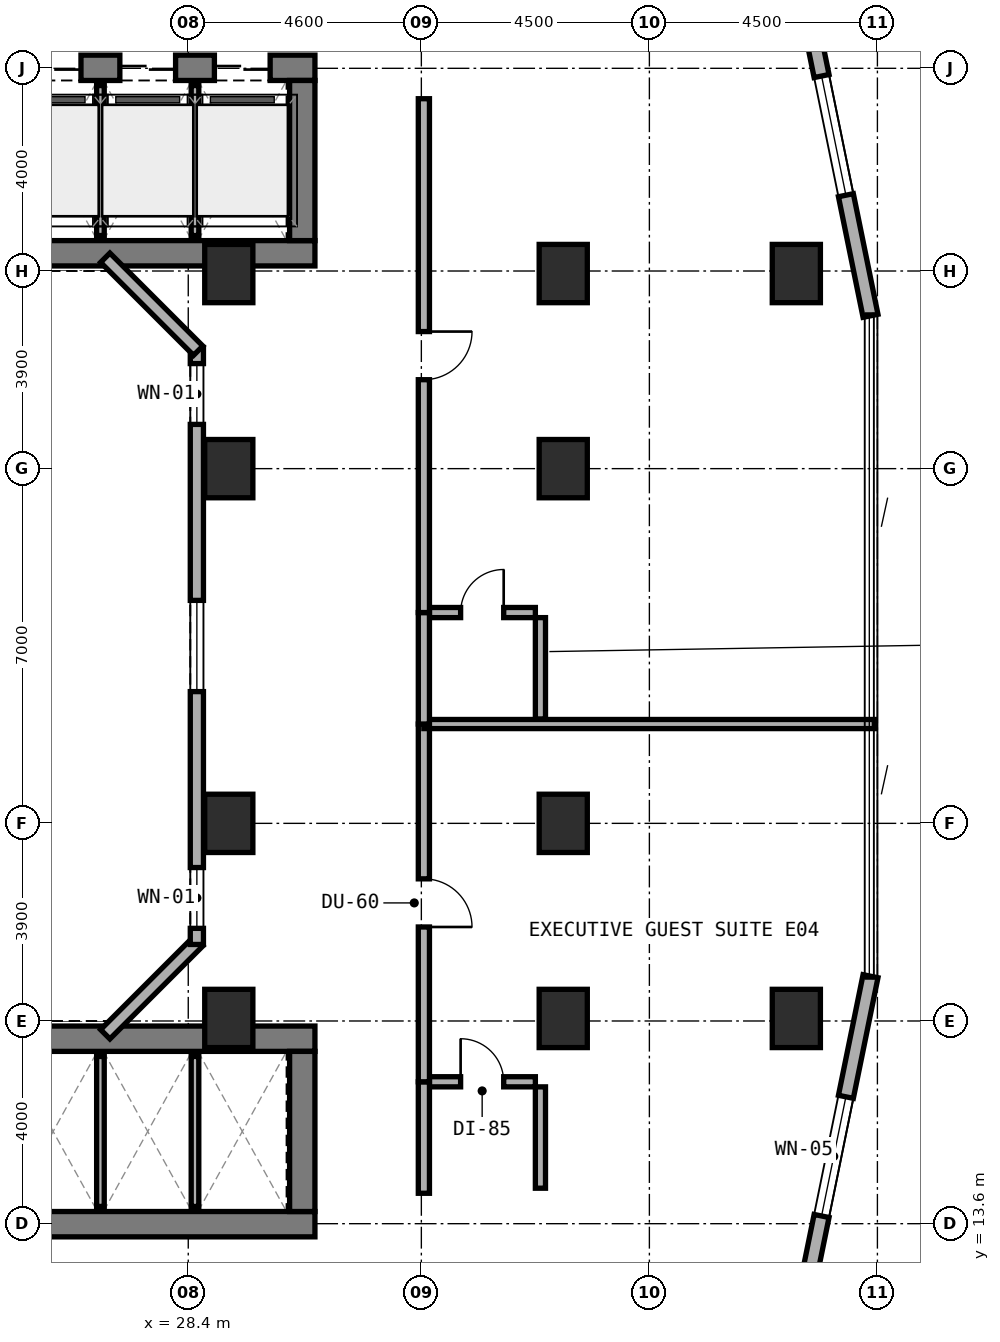
"""IFC4 building model, lengths in metres.
Left out: names, types, materials, properties, quantities, classifications, styles, units other than length and angle.
Written with IfcOpenShell. Run it as: python <this file> out.ifc"""

import sys

from ifc_helpers import new_model, si_unit, direction, frame, frame_2d, origin, origin_2d, place, context, subcontext, project, spatial, rectangle, extrude, element, fill, save


model = new_model("IFC4")
c1 = context("Model", 3, precision=1e-05, world=origin(), true_north=direction((0.0, 1.0)))
c2 = subcontext(c1, "Body", "Model", "MODEL_VIEW")
j1 = project(units=[si_unit("LENGTHUNIT", "METRE"), si_unit("PLANEANGLEUNIT", "RADIAN")], contexts=[c1])
p1 = place(None, origin())
s1 = spatial("IfcSite", under=j1, at=p1, CompositionType="ELEMENT")
p2 = place(p1, origin())
s2 = spatial("IfcBuilding", under=s1, at=p2, CompositionType="ELEMENT")
p3 = place(p2, frame((0.0, 0.0, 62.5)))
s3 = spatial("IfcBuildingStorey", under=s2, at=p3, CompositionType="ELEMENT", Elevation=62.5)
p4 = place(p3, frame((6.3, 32.75, 0.0), z_axis=(0.0, 0.0, 1.0), x_axis=(1.0, 0.0, 0.0)))
e1 = element("IfcWall", 1, at=p4, inside=s3, PredefinedType="SHEAR", context=c2, shape_type="SweptSolid", body=[
    extrude(rectangle(XDim=24.6, YDim=0.5, at=frame_2d((12.3, 0.0))), origin(), (0.0, 0.0, 1.0), 3.5),
])
p5 = place(p4, frame((6.15, 0.0, 0.0)))
e2 = element("IfcOpeningElement", 2, at=p5, cuts=e1, PredefinedType="OPENING", context=c2, shape_type="SweptSolid", body=[
    extrude(rectangle(XDim=1.1, YDim=2.15, at=frame_2d((0.55, 1.075))), frame((0.0, 0.26, 0.0), z_axis=(0.0, -1.0, 0.0), x_axis=(1.0, 0.0, 0.0)), (0.0, 0.0, 1.0), 0.52),
])
p6 = place(p3, frame((6.3, 36.41, 0.0), z_axis=(0.0, 0.0, 1.0), x_axis=(1.0, 0.0, 0.0)))
e3 = element("IfcWall", 3, at=p6, inside=s3, PredefinedType="SHEAR", context=c2, shape_type="SweptSolid", body=[
    extrude(rectangle(XDim=24.6, YDim=0.5, at=frame_2d((12.3, 0.0))), origin(), (0.0, 0.0, 1.0), 3.5),
])
p7 = place(p6, frame((9.25, 0.0, 0.0)))
e4 = element("IfcOpeningElement", 4, at=p7, cuts=e3, PredefinedType="OPENING", context=c2, shape_type="SweptSolid", body=[
    extrude(rectangle(XDim=1.2, YDim=2.15, at=frame_2d((0.6, 1.075))), frame((0.0, 0.26, 0.0), z_axis=(0.0, -1.0, 0.0), x_axis=(1.0, 0.0, 0.0)), (0.0, 0.0, 1.0), 0.52),
])
p8 = place(p6, frame((17.04, 0.0, 0.0)))
e5 = element("IfcOpeningElement", 5, at=p8, cuts=e3, PredefinedType="OPENING", context=c2, shape_type="SweptSolid", body=[
    extrude(rectangle(XDim=0.85, YDim=2.1, at=frame_2d((0.425, 1.05))), frame((0.0, 0.26, 0.0), z_axis=(0.0, -1.0, 0.0), x_axis=(1.0, 0.0, 0.0)), (0.0, 0.0, 1.0), 0.52),
])
p9 = place(p6, frame((18.883, 0.0, 0.0)))
e6 = element("IfcOpeningElement", 6, at=p9, cuts=e3, PredefinedType="OPENING", context=c2, shape_type="SweptSolid", body=[
    extrude(rectangle(XDim=1.1, YDim=2.15, at=frame_2d((0.55, 1.075))), frame((0.0, 0.26, 0.0), z_axis=(0.0, -1.0, 0.0), x_axis=(1.0, 0.0, 0.0)), (0.0, 0.0, 1.0), 0.52),
])
p10 = place(p6, frame((20.75, 0.0, 0.0)))
e7 = element("IfcOpeningElement", 7, at=p10, cuts=e3, PredefinedType="OPENING", context=c2, shape_type="SweptSolid", body=[
    extrude(rectangle(XDim=1.1, YDim=2.15, at=frame_2d((0.55, 1.075))), frame((0.0, 0.26, 0.0), z_axis=(0.0, -1.0, 0.0), x_axis=(1.0, 0.0, 0.0)), (0.0, 0.0, 1.0), 0.52),
])
p11 = place(p6, frame((22.616, 0.0, 0.0)))
e8 = element("IfcOpeningElement", 8, at=p11, cuts=e3, PredefinedType="OPENING", context=c2, shape_type="SweptSolid", body=[
    extrude(rectangle(XDim=1.1, YDim=2.15, at=frame_2d((0.55, 1.075))), frame((0.0, 0.26, 0.0), z_axis=(0.0, -1.0, 0.0), x_axis=(1.0, 0.0, 0.0)), (0.0, 0.0, 1.0), 0.52),
])
p12 = place(p3, frame((30.65, 33.0, 0.0), z_axis=(0.0, 0.0, 1.0), x_axis=(0.0, 1.0, 0.0)))
e9 = element("IfcWall", 9, at=p12, inside=s3, PredefinedType="SHEAR", context=c2, shape_type="SweptSolid", body=[
    extrude(rectangle(XDim=3.16, YDim=0.5, at=frame_2d((1.58, 0.0))), origin(), (0.0, 0.0, 1.0), 3.5),
])
p13 = place(p3, frame((6.3, 13.59, 0.0), z_axis=(0.0, 0.0, 1.0), x_axis=(1.0, 0.0, 0.0)))
e10 = element("IfcWall", 10, at=p13, inside=s3, PredefinedType="SHEAR", context=c2, shape_type="SweptSolid", body=[
    extrude(rectangle(XDim=24.6, YDim=0.5, at=frame_2d((12.3, 0.0))), origin(), (0.0, 0.0, 1.0), 3.5),
])
p14 = place(p13, frame((9.25, 0.0, 0.0)))
e11 = element("IfcOpeningElement", 11, at=p14, cuts=e10, PredefinedType="OPENING", context=c2, shape_type="SweptSolid", body=[
    extrude(rectangle(XDim=1.2, YDim=2.15, at=frame_2d((0.6, 1.075))), frame((0.0, 0.26, 0.0), z_axis=(0.0, -1.0, 0.0), x_axis=(1.0, 0.0, 0.0)), (0.0, 0.0, 1.0), 0.52),
])
p15 = place(p13, frame((17.04, 0.0, 0.0)))
e12 = element("IfcOpeningElement", 12, at=p15, cuts=e10, PredefinedType="OPENING", context=c2, shape_type="SweptSolid", body=[
    extrude(rectangle(XDim=0.85, YDim=2.1, at=frame_2d((0.425, 1.05))), frame((0.0, 0.26, 0.0), z_axis=(0.0, -1.0, 0.0), x_axis=(1.0, 0.0, 0.0)), (0.0, 0.0, 1.0), 0.52),
])
p16 = place(p3, frame((6.3, 17.25, 0.0), z_axis=(0.0, 0.0, 1.0), x_axis=(1.0, 0.0, 0.0)))
e13 = element("IfcWall", 13, at=p16, inside=s3, PredefinedType="SHEAR", context=c2, shape_type="SweptSolid", body=[
    extrude(rectangle(XDim=24.6, YDim=0.5, at=frame_2d((12.3, 0.0))), origin(), (0.0, 0.0, 1.0), 3.5),
])
p17 = place(p3, frame((30.65, 13.84, 0.0), z_axis=(0.0, 0.0, 1.0), x_axis=(0.0, 1.0, 0.0)))
e14 = element("IfcWall", 14, at=p17, inside=s3, PredefinedType="SHEAR", context=c2, shape_type="SweptSolid", body=[
    extrude(rectangle(XDim=3.16, YDim=0.5, at=frame_2d((1.58, 0.0))), origin(), (0.0, 0.0, 1.0), 3.5),
])
for number, where, z_axis, x_axis in (
    (15, (35.8, 21.5, 0.0), (0.0, 0.0, 1.0), (1.0, 0.0, 0.0)),
    (16, (35.8, 28.5, 0.0), (0.0, 0.0, 1.0), (1.0, 0.0, 0.0)),
    (17, (35.8, 17.65, 0.0), (0.0, 0.0, 1.0), (1.0, 0.0, 0.0)),
    (18, (35.8, 32.35, 0.0), (0.0, 0.0, 1.0), (1.0, 0.0, 0.0)),
    (19, (29.2, 17.65, 0.0), (0.0, 0.0, 1.0), (1.0, 0.0, 0.0)),
    (20, (29.2, 32.35, 0.0), (0.0, 0.0, 1.0), (1.0, 0.0, 0.0)),
    (21, (29.2, 21.5, 0.0), (0.0, 0.0, 1.0), (1.0, 0.0, 0.0)),
    (22, (29.2, 28.5, 0.0), (0.0, 0.0, 1.0), (1.0, 0.0, 0.0)),
    (23, (40.4, 17.65, 0.0), (0.0, 0.0, 1.0), (1.0, 0.0, 0.0)),
    (24, (40.4, 32.35, 0.0), (0.0, 0.0, 1.0), (1.0, 0.0, 0.0)),
):
    element("IfcColumn", number, at=place(p3, frame(where, z_axis=z_axis, x_axis=x_axis)), inside=s3, PredefinedType="COLUMN", context=c2, shape_type="SweptSolid", body=[
        extrude(rectangle(XDim=0.95, YDim=1.15, at=origin_2d()), origin(), (0.0, 0.0, 1.0), 3.5),
    ])
p18 = place(p3, frame((39.851, 8.622, 0.0), z_axis=(0.0, 0.0, 1.0), x_axis=(0.199990901713, 0.979797754249, 0.0)))
e25 = element("IfcWall", 25, at=p18, inside=s3, PredefinedType="STANDARD", context=c2, shape_type="SweptSolid", body=[
    extrude(rectangle(XDim=10.065, YDim=0.3, at=frame_2d((5.033, 0.0))), origin(), (0.0, 0.0, 1.0), 3.22),
])
p19 = place(p18, frame((0.378, 0.0, 0.85)))
e26 = element("IfcOpeningElement", 26, at=p19, cuts=e25, PredefinedType="OPENING", context=c2, shape_type="SweptSolid", body=[
    extrude(rectangle(XDim=1.8, YDim=1.5, at=frame_2d((0.9, 0.75))), frame((0.0, 0.16, 0.0), z_axis=(0.0, -1.0, 0.0), x_axis=(1.0, 0.0, 0.0)), (0.0, 0.0, 1.0), 0.32),
])
p20 = place(p18, frame((5.236, 0.0, 0.8)))
e27 = element("IfcOpeningElement", 27, at=p20, cuts=e25, PredefinedType="OPENING", context=c2, shape_type="SweptSolid", body=[
    extrude(rectangle(XDim=2.4, YDim=1.6, at=frame_2d((1.2, 0.8))), frame((0.0, 0.16, 0.0), z_axis=(0.0, -1.0, 0.0), x_axis=(1.0, 0.0, 0.0)), (0.0, 0.0, 1.0), 0.32),
])
p21 = place(p3, frame((41.864, 31.516, 0.0), z_axis=(0.0, 0.0, 1.0), x_axis=(-0.199990901713, 0.979797754249, 0.0)))
e28 = element("IfcWall", 28, at=p21, inside=s3, PredefinedType="STANDARD", context=c2, shape_type="SweptSolid", body=[
    extrude(rectangle(XDim=10.065, YDim=0.3, at=frame_2d((5.033, 0.0))), origin(), (0.0, 0.0, 1.0), 3.22),
])
p22 = place(p21, frame((2.429, 0.0, 0.8)))
e29 = element("IfcOpeningElement", 29, at=p22, cuts=e28, PredefinedType="OPENING", context=c2, shape_type="SweptSolid", body=[
    extrude(rectangle(XDim=2.4, YDim=1.6, at=frame_2d((1.2, 0.8))), frame((0.0, 0.16, 0.0), z_axis=(0.0, -1.0, 0.0), x_axis=(1.0, 0.0, 0.0)), (0.0, 0.0, 1.0), 0.32),
])
p23 = place(p21, frame((7.887, 0.0, 0.85)))
e30 = element("IfcOpeningElement", 30, at=p23, cuts=e28, PredefinedType="OPENING", context=c2, shape_type="SweptSolid", body=[
    extrude(rectangle(XDim=1.8, YDim=1.5, at=frame_2d((0.9, 0.75))), frame((0.0, 0.16, 0.0), z_axis=(0.0, -1.0, 0.0), x_axis=(1.0, 0.0, 0.0)), (0.0, 0.0, 1.0), 0.32),
])
p24 = place(p3, frame((26.762, 17.338, 0.0), z_axis=(0.0, 0.0, 1.0), x_axis=(0.707059717605, 0.707153841636, 0.0)))
e31 = element("IfcWall", 31, at=p24, inside=s3, PredefinedType="STANDARD", context=c2, shape_type="SweptSolid", body=[
    extrude(rectangle(XDim=2.594, YDim=0.26, at=frame_2d((1.297, 0.0))), origin(), (0.0, 0.0, 1.0), 3.22),
])
p25 = place(p3, frame((28.57, 19.11, 0.0), z_axis=(0.0, 0.0, 1.0), x_axis=(0.0, 1.0, 0.0)))
e32 = element("IfcWall", 32, at=p25, inside=s3, PredefinedType="STANDARD", context=c2, shape_type="SweptSolid", body=[
    extrude(rectangle(XDim=11.78, YDim=0.26, at=frame_2d((5.89, 0.0))), origin(), (0.0, 0.0, 1.0), 3.22),
])
p26 = place(p25, frame((0.318, 0.0, 0.85)))
e33 = element("IfcOpeningElement", 33, at=p26, cuts=e32, PredefinedType="OPENING", context=c2, shape_type="SweptSolid", body=[
    extrude(rectangle(XDim=1.2, YDim=1.5, at=frame_2d((0.6, 0.75))), frame((0.0, 0.14, 0.0), z_axis=(0.0, -1.0, 0.0), x_axis=(1.0, 0.0, 0.0)), (0.0, 0.0, 1.0), 0.28),
])
p27 = place(p25, frame((4.99, 0.0, 0.85)))
e34 = element("IfcOpeningElement", 34, at=p27, cuts=e32, PredefinedType="OPENING", context=c2, shape_type="SweptSolid", body=[
    extrude(rectangle(XDim=1.8, YDim=1.5, at=frame_2d((0.9, 0.75))), frame((0.0, 0.14, 0.0), z_axis=(0.0, -1.0, 0.0), x_axis=(1.0, 0.0, 0.0)), (0.0, 0.0, 1.0), 0.28),
])
p28 = place(p25, frame((10.263, 0.0, 0.85)))
e35 = element("IfcOpeningElement", 35, at=p28, cuts=e32, PredefinedType="OPENING", context=c2, shape_type="SweptSolid", body=[
    extrude(rectangle(XDim=1.2, YDim=1.5, at=frame_2d((0.6, 0.75))), frame((0.0, 0.14, 0.0), z_axis=(0.0, -1.0, 0.0), x_axis=(1.0, 0.0, 0.0)), (0.0, 0.0, 1.0), 0.28),
])
p29 = place(p3, frame((28.596, 30.828, 0.0), z_axis=(0.0, 0.0, 1.0), x_axis=(-0.707059717605, 0.707153841636, 0.0)))
e36 = element("IfcWall", 36, at=p29, inside=s3, PredefinedType="STANDARD", context=c2, shape_type="SweptSolid", body=[
    extrude(rectangle(XDim=2.594, YDim=0.26, at=frame_2d((1.297, 0.0))), origin(), (0.0, 0.0, 1.0), 3.22),
])
p30 = place(p3, frame((26.667, 33.1, 0.0), z_axis=(0.0, 0.0, 1.0), x_axis=(0.0, 1.0, 0.0)))
e37 = element("IfcWall", 37, at=p30, inside=s3, PredefinedType="PARTITIONING", context=c2, shape_type="SweptSolid", body=[
    extrude(rectangle(XDim=2.96, YDim=0.15, at=frame_2d((1.48, 0.0))), origin(), (0.0, 0.0, 1.0), 3.22),
])
p31 = place(p3, frame((28.533, 33.1, 0.0), z_axis=(0.0, 0.0, 1.0), x_axis=(0.0, 1.0, 0.0)))
e38 = element("IfcWall", 38, at=p31, inside=s3, PredefinedType="PARTITIONING", context=c2, shape_type="SweptSolid", body=[
    extrude(rectangle(XDim=2.96, YDim=0.15, at=frame_2d((1.48, 0.0))), origin(), (0.0, 0.0, 1.0), 2.495),
])
p32 = place(p3, frame((26.667, 13.94, 0.0), z_axis=(0.0, 0.0, 1.0), x_axis=(0.0, 1.0, 0.0)))
e39 = element("IfcWall", 39, at=p32, inside=s3, PredefinedType="PARTITIONING", context=c2, shape_type="SweptSolid", body=[
    extrude(rectangle(XDim=2.96, YDim=0.15, at=frame_2d((1.48, 0.0))), origin(), (0.0, 0.0, 1.0), 3.22),
])
p33 = place(p3, frame((28.533, 13.94, 0.0), z_axis=(0.0, 0.0, 1.0), x_axis=(0.0, 1.0, 0.0)))
e40 = element("IfcWall", 40, at=p33, inside=s3, PredefinedType="PARTITIONING", context=c2, shape_type="SweptSolid", body=[
    extrude(rectangle(XDim=2.96, YDim=0.15, at=frame_2d((1.48, 0.0))), origin(), (0.0, 0.0, 1.0), 2.495),
])
p34 = place(p3, frame((33.15, 16.4, 0.0), z_axis=(0.0, 0.0, 1.0), x_axis=(1.0, 0.0, 0.0)))
e41 = element("IfcWall", 41, at=p34, inside=s3, PredefinedType="PLUMBINGWALL", context=c2, shape_type="SweptSolid", body=[
    extrude(rectangle(XDim=2.1, YDim=0.2, at=frame_2d((1.05, 0.0))), origin(), (0.0, 0.0, 1.0), 3.22),
])
p35 = place(p34, frame((0.625, 0.0, 0.0)))
e42 = element("IfcOpeningElement", 42, at=p35, cuts=e41, PredefinedType="OPENING", context=c2, shape_type="SweptSolid", body=[
    extrude(rectangle(XDim=0.85, YDim=2.1, at=frame_2d((0.425, 1.05))), frame((0.0, 0.11, 0.0), z_axis=(0.0, -1.0, 0.0), x_axis=(1.0, 0.0, 0.0)), (0.0, 0.0, 1.0), 0.22),
])
p36 = place(p3, frame((35.35, 14.3, 0.0), z_axis=(0.0, 0.0, 1.0), x_axis=(0.0, 1.0, 0.0)))
e43 = element("IfcWall", 43, at=p36, inside=s3, PredefinedType="PLUMBINGWALL", context=c2, shape_type="SweptSolid", body=[
    extrude(rectangle(XDim=2.0, YDim=0.2, at=frame_2d((1.0, 0.0))), origin(), (0.0, 0.0, 1.0), 2.745),
])
p37 = place(p3, frame((33.05, 14.2, 0.0), z_axis=(0.0, 0.0, 1.0), x_axis=(0.0, 1.0, 0.0)))
e44 = element("IfcWall", 44, at=p37, inside=s3, PredefinedType="SOLIDWALL", context=c2, shape_type="SweptSolid", body=[
    extrude(rectangle(XDim=2.2, YDim=0.22, at=frame_2d((1.1, 0.0))), origin(), (0.0, 0.0, 1.0), 3.22),
])
p38 = place(p3, frame((33.05, 16.4, 0.0), z_axis=(0.0, 0.0, 1.0), x_axis=(0.0, 1.0, 0.0)))
e45 = element("IfcWall", 45, at=p38, inside=s3, PredefinedType="SOLIDWALL", context=c2, shape_type="SweptSolid", body=[
    extrude(rectangle(XDim=7.06, YDim=0.22, at=frame_2d((3.53, 0.0))), origin(), (0.0, 0.0, 1.0), 2.495),
])
p39 = place(p38, frame((3.055, 0.0, 0.0)))
e46 = element("IfcOpeningElement", 46, at=p39, cuts=e45, PredefinedType="OPENING", context=c2, shape_type="SweptSolid", body=[
    extrude(rectangle(XDim=0.95, YDim=2.1, at=frame_2d((0.475, 1.05))), frame((0.0, 0.12, 0.0), z_axis=(0.0, -1.0, 0.0), x_axis=(1.0, 0.0, 0.0)), (0.0, 0.0, 1.0), 0.24),
])
p40 = place(p3, frame((33.05, 23.46, 0.0), z_axis=(0.0, 0.0, 1.0), x_axis=(1.0, 0.0, 0.0)))
e47 = element("IfcWall", 47, at=p40, inside=s3, PredefinedType="SOLIDWALL", context=c2, shape_type="SweptSolid", body=[
    extrude(rectangle(XDim=8.89, YDim=0.18, at=frame_2d((4.445, 0.0))), origin(), (0.0, 0.0, 1.0), 2.745),
])
p41 = place(p3, frame((33.15, 25.66, 0.0), z_axis=(0.0, 0.0, 1.0), x_axis=(1.0, 0.0, 0.0)))
e48 = element("IfcWall", 48, at=p41, inside=s3, PredefinedType="PLUMBINGWALL", context=c2, shape_type="SweptSolid", body=[
    extrude(rectangle(XDim=2.1, YDim=0.2, at=frame_2d((1.05, 0.0))), origin(), (0.0, 0.0, 1.0), 3.22),
])
p42 = place(p41, frame((0.625, 0.0, 0.0)))
e49 = element("IfcOpeningElement", 49, at=p42, cuts=e48, PredefinedType="OPENING", context=c2, shape_type="SweptSolid", body=[
    extrude(rectangle(XDim=0.85, YDim=2.1, at=frame_2d((0.425, 1.05))), frame((0.0, 0.11, 0.0), z_axis=(0.0, -1.0, 0.0), x_axis=(1.0, 0.0, 0.0)), (0.0, 0.0, 1.0), 0.22),
])
p43 = place(p3, frame((35.35, 23.56, 0.0), z_axis=(0.0, 0.0, 1.0), x_axis=(0.0, 1.0, 0.0)))
e50 = element("IfcWall", 50, at=p43, inside=s3, PredefinedType="PLUMBINGWALL", context=c2, shape_type="SweptSolid", body=[
    extrude(rectangle(XDim=2.0, YDim=0.2, at=frame_2d((1.0, 0.0))), origin(), (0.0, 0.0, 1.0), 3.22),
])
p44 = place(p3, frame((33.05, 23.46, 0.0), z_axis=(0.0, 0.0, 1.0), x_axis=(0.0, 1.0, 0.0)))
e51 = element("IfcWall", 51, at=p44, inside=s3, PredefinedType="SOLIDWALL", context=c2, shape_type="SweptSolid", body=[
    extrude(rectangle(XDim=2.2, YDim=0.22, at=frame_2d((1.1, 0.0))), origin(), (0.0, 0.0, 1.0), 3.22),
])
p45 = place(p3, frame((33.05, 25.66, 0.0), z_axis=(0.0, 0.0, 1.0), x_axis=(0.0, 1.0, 0.0)))
e52 = element("IfcWall", 52, at=p45, inside=s3, PredefinedType="SOLIDWALL", context=c2, shape_type="SweptSolid", body=[
    extrude(rectangle(XDim=10.14, YDim=0.22, at=frame_2d((5.07, 0.0))), origin(), (0.0, 0.0, 1.0), 2.495),
])
p46 = place(p45, frame((4.595, 0.0, 0.0)))
e53 = element("IfcOpeningElement", 53, at=p46, cuts=e52, PredefinedType="OPENING", context=c2, shape_type="SweptSolid", body=[
    extrude(rectangle(XDim=0.95, YDim=2.1, at=frame_2d((0.475, 1.05))), frame((0.0, 0.12, 0.0), z_axis=(0.0, -1.0, 0.0), x_axis=(1.0, 0.0, 0.0)), (0.0, 0.0, 1.0), 0.24),
])
p47 = place(p20, origin())
e54 = element("IfcWindow", 54, at=p47, inside=s3, PartitioningType="SINGLE_PANEL", PredefinedType="WINDOW", context=c2, shape_type="SweptSolid", body=[
    extrude(rectangle(XDim=2.4, YDim=1.6, at=frame_2d((1.2, 0.8))), frame((0.0, 0.03, 0.0), z_axis=(0.0, -1.0, 0.0), x_axis=(1.0, 0.0, 0.0)), (0.0, 0.0, 1.0), 0.06),
])
fill(e27, e54)
p48 = place(p22, origin())
e55 = element("IfcWindow", 55, at=p48, inside=s3, PartitioningType="SINGLE_PANEL", PredefinedType="WINDOW", context=c2, shape_type="SweptSolid", body=[
    extrude(rectangle(XDim=2.4, YDim=1.6, at=frame_2d((1.2, 0.8))), frame((0.0, 0.03, 0.0), z_axis=(0.0, -1.0, 0.0), x_axis=(1.0, 0.0, 0.0)), (0.0, 0.0, 1.0), 0.06),
])
fill(e29, e55)
p49 = place(p26, origin())
e56 = element("IfcWindow", 56, at=p49, inside=s3, PartitioningType="SINGLE_PANEL", PredefinedType="WINDOW", context=c2, shape_type="SweptSolid", body=[
    extrude(rectangle(XDim=1.2, YDim=1.5, at=frame_2d((0.6, 0.75))), frame((0.0, 0.03, 0.0), z_axis=(0.0, -1.0, 0.0), x_axis=(1.0, 0.0, 0.0)), (0.0, 0.0, 1.0), 0.06),
])
fill(e33, e56)
p50 = place(p27, origin())
e57 = element("IfcWindow", 57, at=p50, inside=s3, PartitioningType="SINGLE_PANEL", PredefinedType="WINDOW", context=c2, shape_type="SweptSolid", body=[
    extrude(rectangle(XDim=1.8, YDim=1.5, at=frame_2d((0.9, 0.75))), frame((0.0, 0.03, 0.0), z_axis=(0.0, -1.0, 0.0), x_axis=(1.0, 0.0, 0.0)), (0.0, 0.0, 1.0), 0.06),
])
fill(e34, e57)
p51 = place(p28, origin())
e58 = element("IfcWindow", 58, at=p51, inside=s3, PartitioningType="SINGLE_PANEL", PredefinedType="WINDOW", context=c2, shape_type="SweptSolid", body=[
    extrude(rectangle(XDim=1.2, YDim=1.5, at=frame_2d((0.6, 0.75))), frame((0.0, 0.03, 0.0), z_axis=(0.0, -1.0, 0.0), x_axis=(1.0, 0.0, 0.0)), (0.0, 0.0, 1.0), 0.06),
])
fill(e35, e58)
p52 = place(p9, origin())
e59 = element("IfcDoor", 59, at=p52, inside=s3, OperationType="DOUBLE_DOOR_SLIDING", PredefinedType="DOOR", context=c2, shape_type="SweptSolid", body=[
    extrude(rectangle(XDim=1.1, YDim=2.15, at=frame_2d((0.55, 1.075))), frame((0.0, 0.025, 0.0), z_axis=(0.0, -1.0, 0.0), x_axis=(1.0, 0.0, 0.0)), (0.0, 0.0, 1.0), 0.05),
])
fill(e6, e59)
p53 = place(p10, origin())
e60 = element("IfcDoor", 60, at=p53, inside=s3, OperationType="DOUBLE_DOOR_SLIDING", PredefinedType="DOOR", context=c2, shape_type="SweptSolid", body=[
    extrude(rectangle(XDim=1.1, YDim=2.15, at=frame_2d((0.55, 1.075))), frame((0.0, 0.025, 0.0), z_axis=(0.0, -1.0, 0.0), x_axis=(1.0, 0.0, 0.0)), (0.0, 0.0, 1.0), 0.05),
])
fill(e7, e60)
p54 = place(p11, origin())
e61 = element("IfcDoor", 61, at=p54, inside=s3, OperationType="DOUBLE_DOOR_SLIDING", PredefinedType="DOOR", context=c2, shape_type="SweptSolid", body=[
    extrude(rectangle(XDim=1.1, YDim=2.15, at=frame_2d((0.55, 1.075))), frame((0.0, 0.025, 0.0), z_axis=(0.0, -1.0, 0.0), x_axis=(1.0, 0.0, 0.0)), (0.0, 0.0, 1.0), 0.05),
])
fill(e8, e61)
p55 = place(p35, origin())
e62 = element("IfcDoor", 62, at=p55, inside=s3, OperationType="SINGLE_SWING_LEFT", PredefinedType="DOOR", context=c2, shape_type="SweptSolid", body=[
    extrude(rectangle(XDim=0.85, YDim=2.1, at=frame_2d((0.425, 1.05))), frame((0.0, 0.025, 0.0), z_axis=(0.0, -1.0, 0.0), x_axis=(1.0, 0.0, 0.0)), (0.0, 0.0, 1.0), 0.05),
])
fill(e42, e62)
p56 = place(p39, frame((0.95, 0.0, 0.0), z_axis=(0.0, 0.0, 1.0), x_axis=(-1.0, 0.0, 0.0)))
e63 = element("IfcDoor", 63, at=p56, inside=s3, OperationType="SINGLE_SWING_RIGHT", PredefinedType="DOOR", context=c2, shape_type="SweptSolid", body=[
    extrude(rectangle(XDim=0.95, YDim=2.1, at=frame_2d((0.475, 1.05))), frame((0.0, 0.025, 0.0), z_axis=(0.0, -1.0, 0.0), x_axis=(1.0, 0.0, 0.0)), (0.0, 0.0, 1.0), 0.05),
])
fill(e46, e63)
p57 = place(p42, origin())
e64 = element("IfcDoor", 64, at=p57, inside=s3, OperationType="SINGLE_SWING_RIGHT", PredefinedType="DOOR", context=c2, shape_type="SweptSolid", body=[
    extrude(rectangle(XDim=0.85, YDim=2.1, at=frame_2d((0.425, 1.05))), frame((0.0, 0.025, 0.0), z_axis=(0.0, -1.0, 0.0), x_axis=(1.0, 0.0, 0.0)), (0.0, 0.0, 1.0), 0.05),
])
fill(e49, e64)
p58 = place(p46, frame((0.95, 0.0, 0.0), z_axis=(0.0, 0.0, 1.0), x_axis=(-1.0, 0.0, 0.0)))
e65 = element("IfcDoor", 65, at=p58, inside=s3, OperationType="SINGLE_SWING_LEFT", PredefinedType="DOOR", context=c2, shape_type="SweptSolid", body=[
    extrude(rectangle(XDim=0.95, YDim=2.1, at=frame_2d((0.475, 1.05))), frame((0.0, 0.025, 0.0), z_axis=(0.0, -1.0, 0.0), x_axis=(1.0, 0.0, 0.0)), (0.0, 0.0, 1.0), 0.05),
])
fill(e53, e65)
save(model, sys.argv[1])
